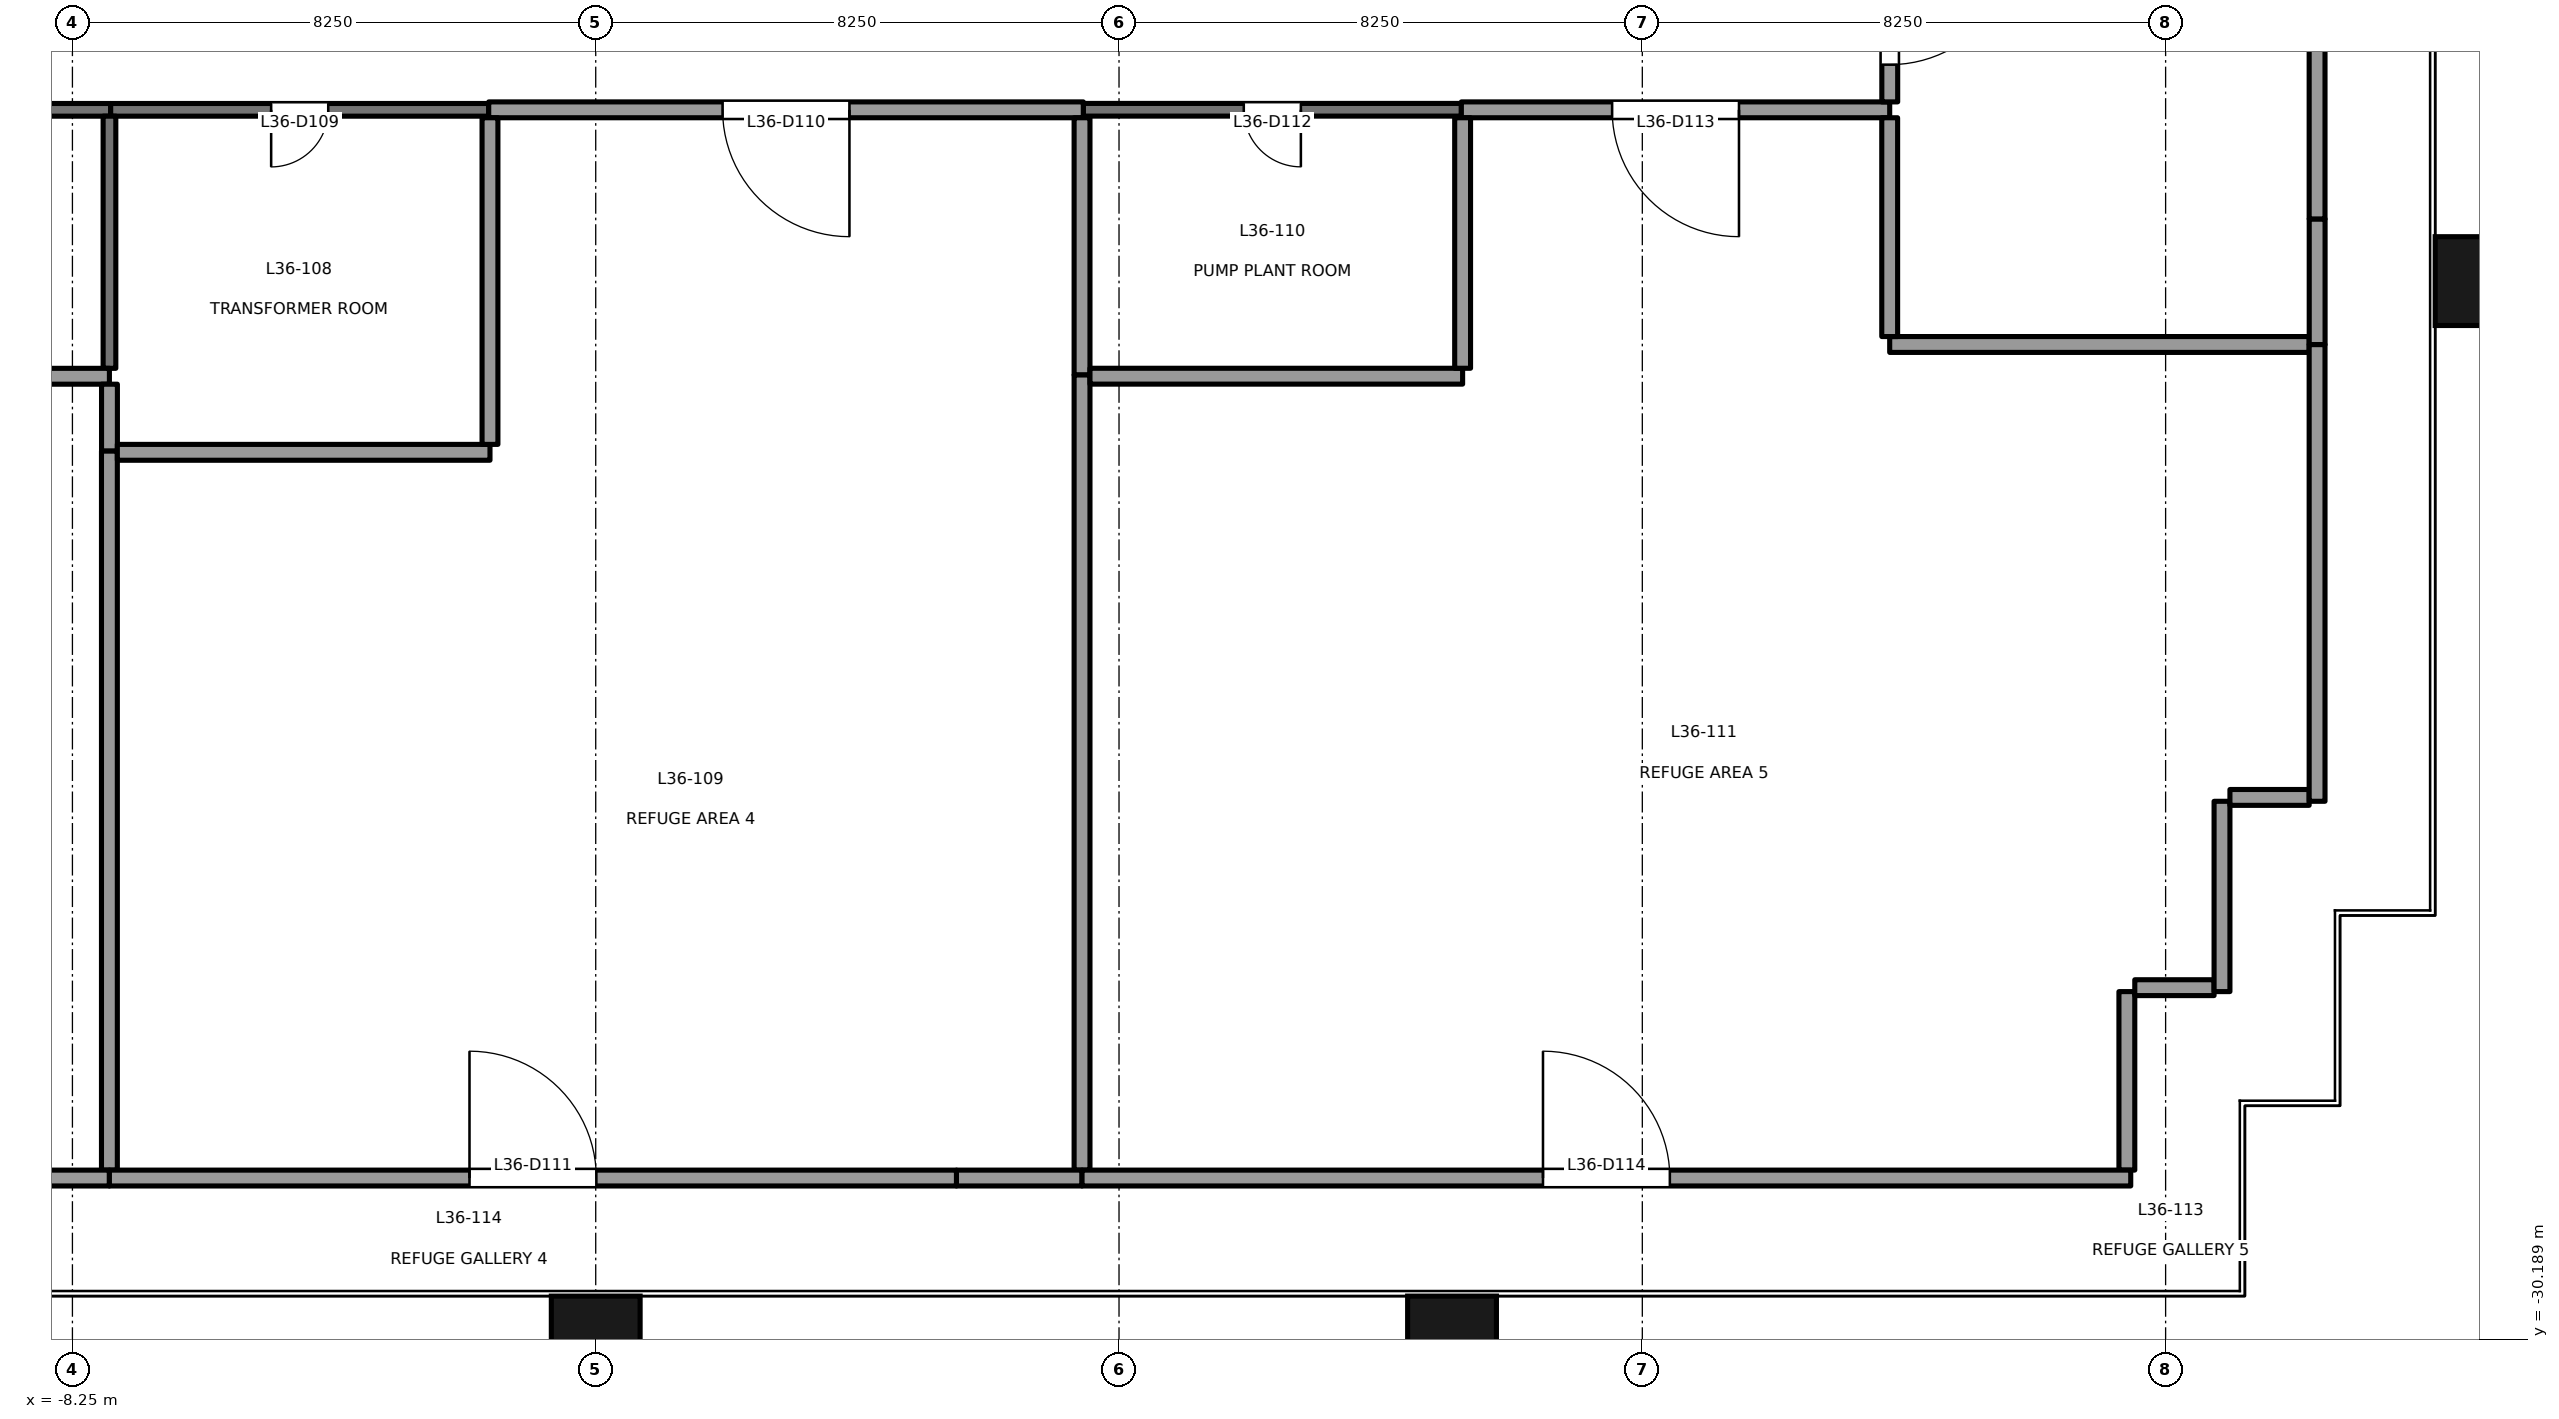
"""IFC4 building model, lengths in metres.
Left out: names, types, materials, properties, quantities, classifications, styles, units other than length and angle.
Written with IfcOpenShell. Run it as: python <this file> out.ifc"""

import sys

from ifc_helpers import new_model, si_unit, direction, frame, frame_2d, origin, origin_2d, place, context, subcontext, project, spatial, rectangle, extrude, element, fill, save


model = new_model("IFC4")
c1 = context("Model", 3, precision=1e-05, world=origin(), true_north=direction((0.0, 1.0)))
c2 = subcontext(c1, "Body", "Model", "MODEL_VIEW")
j1 = project(units=[si_unit("LENGTHUNIT", "METRE"), si_unit("PLANEANGLEUNIT", "RADIAN")], contexts=[c1])
p1 = place(None, origin())
s1 = spatial("IfcSite", under=j1, at=p1, CompositionType="ELEMENT")
p2 = place(p1, origin())
s2 = spatial("IfcBuilding", under=s1, at=p2, CompositionType="ELEMENT")
p3 = place(p2, frame((0.0, 0.0, 158.1)))
s3 = spatial("IfcBuildingStorey", under=s2, at=p3, CompositionType="ELEMENT", Elevation=158.1)
for number, where, z_axis, x_axis in (
    (1, (0.0, -30.4, -0.2), (0.0, 0.0, 1.0), (1.0, 0.0, 0.0)),
    (2, (13.5, -30.4, -0.2), (0.0, 0.0, 1.0), (1.0, 0.0, 0.0)),
    (3, (29.9, -13.5, -0.2), (0.0, 0.0, 1.0), (0.0, 1.0, 0.0)),
):
    element("IfcColumn", number, at=place(p3, frame(where, z_axis=z_axis, x_axis=x_axis)), inside=s3, PredefinedType="COLUMN", context=c2, shape_type="SweptSolid", body=[
        extrude(rectangle(XDim=1.4, YDim=1.8, at=origin_2d()), origin(), (0.0, 0.0, 1.0), 5.0),
    ])
p4 = place(p3, frame((-7.647, -10.8, 0.0), z_axis=(0.0, 0.0, 1.0), x_axis=(-1.0, 0.0, 0.0)))
e4 = element("IfcWall", 4, at=p4, inside=s3, PredefinedType="PARTITIONING", context=c2, shape_type="SweptSolid", body=[
    extrude(rectangle(XDim=6.0, YDim=0.2, at=frame_2d((3.0, 0.0))), origin(), (0.0, 0.0, 1.0), 3.9),
])
p5 = place(p4, frame((2.55, 0.0, 0.0)))
e5 = element("IfcOpeningElement", 5, at=p5, cuts=e4, PredefinedType="OPENING", context=c2, shape_type="SweptSolid", body=[
    extrude(rectangle(XDim=0.9, YDim=2.1, at=frame_2d((0.45, 1.05))), frame((0.0, 0.111, 0.0), z_axis=(0.0, -1.0, 0.0), x_axis=(1.0, 0.0, 0.0)), (0.0, 0.0, 1.0), 0.221),
])
p6 = place(p3, frame((-1.687, -10.8, 0.0), z_axis=(0.0, 0.0, 1.0), x_axis=(-1.0, 0.0, 0.0)))
e6 = element("IfcWall", 6, at=p6, inside=s3, PredefinedType="PARTITIONING", context=c2, shape_type="SweptSolid", body=[
    extrude(rectangle(XDim=5.96, YDim=0.2, at=frame_2d((2.98, 0.0))), origin(), (0.0, 0.0, 1.0), 4.0),
])
p7 = place(p6, frame((2.53, 0.0, 0.0)))
e7 = element("IfcOpeningElement", 7, at=p7, cuts=e6, PredefinedType="OPENING", context=c2, shape_type="SweptSolid", body=[
    extrude(rectangle(XDim=0.9, YDim=2.1, at=frame_2d((0.45, 1.05))), frame((0.0, 0.111, 0.0), z_axis=(0.0, -1.0, 0.0), x_axis=(1.0, 0.0, 0.0)), (0.0, 0.0, 1.0), 0.221),
])
p8 = place(p3, frame((7.687, -10.8, 0.0), z_axis=(0.0, 0.0, 1.0), x_axis=(-1.0, 0.0, 0.0)))
e8 = element("IfcWall", 8, at=p8, inside=s3, PredefinedType="PARTITIONING", context=c2, shape_type="SweptSolid", body=[
    extrude(rectangle(XDim=9.374, YDim=0.25, at=frame_2d((4.687, 0.0))), origin(), (0.0, 0.0, 1.0), 2.55),
])
p9 = place(p8, frame((3.687, 0.0, 0.0)))
e9 = element("IfcOpeningElement", 9, at=p9, cuts=e8, PredefinedType="OPENING", context=c2, shape_type="SweptSolid", body=[
    extrude(rectangle(XDim=2.0, YDim=2.1, at=frame_2d((1.0, 1.05))), frame((0.0, 0.135, 0.0), z_axis=(0.0, -1.0, 0.0), x_axis=(1.0, 0.0, 0.0)), (0.0, 0.0, 1.0), 0.271),
])
p10 = place(p3, frame((13.647, -10.799, 0.0), z_axis=(0.0, 0.0, 1.0), x_axis=(-1.0, 0.0, 0.0)))
e10 = element("IfcWall", 10, at=p10, inside=s3, PredefinedType="PARTITIONING", context=c2, shape_type="SweptSolid", body=[
    extrude(rectangle(XDim=5.96, YDim=0.2, at=frame_2d((2.98, 0.0))), origin(), (0.0, 0.0, 1.0), 2.55),
])
p11 = place(p10, frame((2.53, 0.0, 0.0)))
e11 = element("IfcOpeningElement", 11, at=p11, cuts=e10, PredefinedType="OPENING", context=c2, shape_type="SweptSolid", body=[
    extrude(rectangle(XDim=0.9, YDim=2.1, at=frame_2d((0.45, 1.05))), frame((0.0, 0.111, 0.0), z_axis=(0.0, -1.0, 0.0), x_axis=(1.0, 0.0, 0.0)), (0.0, 0.0, 1.0), 0.221),
])
p12 = place(p3, frame((20.4, -10.8, 0.0), z_axis=(0.0, 0.0, 1.0), x_axis=(-1.0, 0.0, 0.0)))
e12 = element("IfcWall", 12, at=p12, inside=s3, PredefinedType="PARTITIONING", context=c2, shape_type="SweptSolid", body=[
    extrude(rectangle(XDim=6.753, YDim=0.25, at=frame_2d((3.376, 0.0))), origin(), (0.0, 0.0, 1.0), 2.55),
])
p13 = place(p12, frame((2.376, 0.0, 0.0)))
e13 = element("IfcOpeningElement", 13, at=p13, cuts=e12, PredefinedType="OPENING", context=c2, shape_type="SweptSolid", body=[
    extrude(rectangle(XDim=2.0, YDim=2.1, at=frame_2d((1.0, 1.05))), frame((0.0, 0.135, 0.0), z_axis=(0.0, -1.0, 0.0), x_axis=(1.0, 0.0, 0.0)), (0.0, 0.0, 1.0), 0.271),
])
p14 = place(p3, frame((20.401, -7.5, 0.0), z_axis=(0.0, 0.0, 1.0), x_axis=(0.0, -1.0, 0.0)))
e14 = element("IfcWall", 14, at=p14, inside=s3, PredefinedType="PARTITIONING", context=c2, shape_type="SweptSolid", body=[
    extrude(rectangle(XDim=3.175, YDim=0.25, at=frame_2d((1.587, 0.0))), origin(), (0.0, 0.0, 1.0), 4.8),
])
p15 = place(p14, frame((0.588, 0.0, 0.0)))
e15 = element("IfcOpeningElement", 15, at=p15, cuts=e14, PredefinedType="OPENING", context=c2, shape_type="SweptSolid", body=[
    extrude(rectangle(XDim=2.0, YDim=2.1, at=frame_2d((1.0, 1.05))), frame((0.0, 0.135, 0.0), z_axis=(0.0, -1.0, 0.0), x_axis=(1.0, 0.0, 0.0)), (0.0, 0.0, 1.0), 0.271),
])
p16 = place(p3, frame((-7.667, -15.0, 0.0), z_axis=(0.0, 0.0, 1.0), x_axis=(-1.0, 0.0, 0.0)))
e16 = element("IfcWall", 16, at=p16, inside=s3, PredefinedType="PARTITIONING", context=c2, shape_type="SweptSolid", body=[
    extrude(rectangle(XDim=6.0, YDim=0.25, at=frame_2d((3.0, 0.0))), origin(), (0.0, 0.0, 1.0), 3.9),
])
p17 = place(p3, frame((-7.666, -10.9, 0.0), z_axis=(0.0, 0.0, 1.0), x_axis=(0.0, -1.0, 0.0)))
e17 = element("IfcWall", 17, at=p17, inside=s3, PredefinedType="PARTITIONING", context=c2, shape_type="SweptSolid", body=[
    extrude(rectangle(XDim=3.975, YDim=0.2, at=frame_2d((1.988, 0.0))), origin(), (0.0, 0.0, 1.0), 4.8),
])
p18 = place(p3, frame((-7.666, -15.125, 0.0), z_axis=(0.0, 0.0, 1.0), x_axis=(0.0, -1.0, 0.0)))
e18 = element("IfcWall", 18, at=p18, inside=s3, PredefinedType="PARTITIONING", context=c2, shape_type="SweptSolid", body=[
    extrude(rectangle(XDim=1.055, YDim=0.25, at=frame_2d((0.527, 0.0))), origin(), (0.0, 0.0, 1.0), 4.8),
])
p19 = place(p3, frame((-7.667, -16.18, 0.0), z_axis=(0.0, 0.0, 1.0), x_axis=(0.0, -1.0, 0.0)))
e19 = element("IfcWall", 19, at=p19, inside=s3, PredefinedType="PARTITIONING", context=c2, shape_type="SweptSolid", body=[
    extrude(rectangle(XDim=11.334, YDim=0.25, at=frame_2d((5.667, 0.0))), origin(), (0.0, 0.0, 1.0), 3.7),
])
p20 = place(p3, frame((-7.667, -27.639, 0.0), z_axis=(0.0, 0.0, 1.0), x_axis=(-1.0, 0.0, 0.0)))
e20 = element("IfcWall", 20, at=p20, inside=s3, PredefinedType="PARTITIONING", context=c2, shape_type="SweptSolid", body=[
    extrude(rectangle(XDim=1.98, YDim=0.25, at=frame_2d((0.99, 0.0))), origin(), (0.0, 0.0, 1.0), 4.8),
])
p21 = place(p3, frame((-1.667, -16.199, 0.0), z_axis=(0.0, 0.0, 1.0), x_axis=(-1.0, 0.0, 0.0)))
e21 = element("IfcWall", 21, at=p21, inside=s3, PredefinedType="PARTITIONING", context=c2, shape_type="SweptSolid", body=[
    extrude(rectangle(XDim=5.875, YDim=0.25, at=frame_2d((2.938, 0.0))), origin(), (0.0, 0.0, 1.0), 4.0),
])
p22 = place(p3, frame((-1.667, -10.925, 0.0), z_axis=(0.0, 0.0, 1.0), x_axis=(0.0, -1.0, 0.0)))
e22 = element("IfcWall", 22, at=p22, inside=s3, PredefinedType="PARTITIONING", context=c2, shape_type="SweptSolid", body=[
    extrude(rectangle(XDim=5.149, YDim=0.25, at=frame_2d((2.574, 0.0))), origin(), (0.0, 0.0, 1.0), 4.8),
])
p23 = place(p3, frame((7.667, -10.925, 0.0), z_axis=(0.0, 0.0, 1.0), x_axis=(0.0, -1.0, 0.0)))
e23 = element("IfcWall", 23, at=p23, inside=s3, PredefinedType="PARTITIONING", context=c2, shape_type="SweptSolid", body=[
    extrude(rectangle(XDim=4.055, YDim=0.25, at=frame_2d((2.027, 0.0))), origin(), (0.0, 0.0, 1.0), 4.8),
])
p24 = place(p3, frame((7.667, -14.98, 0.0), z_axis=(0.0, 0.0, 1.0), x_axis=(0.0, -1.0, 0.0)))
e24 = element("IfcWall", 24, at=p24, inside=s3, PredefinedType="PARTITIONING", context=c2, shape_type="SweptSolid", body=[
    extrude(rectangle(XDim=12.534, YDim=0.25, at=frame_2d((6.267, 0.0))), origin(), (0.0, 0.0, 1.0), 3.7),
])
p25 = place(p3, frame((7.667, -27.639, 0.0), z_axis=(0.0, 0.0, 1.0), x_axis=(-1.0, 0.0, 0.0)))
e25 = element("IfcWall", 25, at=p25, inside=s3, PredefinedType="PARTITIONING", context=c2, shape_type="SweptSolid", body=[
    extrude(rectangle(XDim=1.98, YDim=0.25, at=frame_2d((0.99, 0.0))), origin(), (0.0, 0.0, 1.0), 4.8),
])
p26 = place(p3, frame((-7.667, -27.639, 0.0), z_axis=(0.0, 0.0, 1.0), x_axis=(1.0, 0.0, 0.0)))
e26 = element("IfcWall", 26, at=p26, inside=s3, PredefinedType="PARTITIONING", context=c2, shape_type="SweptSolid", body=[
    extrude(rectangle(XDim=13.354, YDim=0.25, at=frame_2d((6.677, 0.0))), origin(), (0.0, 0.0, 1.0), 2.55),
])
p27 = place(p26, frame((5.677, 0.0, 0.0)))
e27 = element("IfcOpeningElement", 27, at=p27, cuts=e26, PredefinedType="OPENING", context=c2, shape_type="SweptSolid", body=[
    extrude(rectangle(XDim=2.0, YDim=2.1, at=frame_2d((1.0, 1.05))), frame((0.0, 0.135, 0.0), z_axis=(0.0, -1.0, 0.0), x_axis=(1.0, 0.0, 0.0)), (0.0, 0.0, 1.0), 0.271),
])
p28 = place(p3, frame((13.667, -14.999, 0.0), z_axis=(0.0, 0.0, 1.0), x_axis=(-1.0, 0.0, 0.0)))
e28 = element("IfcWall", 28, at=p28, inside=s3, PredefinedType="PARTITIONING", context=c2, shape_type="SweptSolid", body=[
    extrude(rectangle(XDim=5.875, YDim=0.25, at=frame_2d((2.938, 0.0))), origin(), (0.0, 0.0, 1.0), 2.55),
])
p29 = place(p3, frame((13.667, -10.925, 0.0), z_axis=(0.0, 0.0, 1.0), x_axis=(0.0, -1.0, 0.0)))
e29 = element("IfcWall", 29, at=p29, inside=s3, PredefinedType="PARTITIONING", context=c2, shape_type="SweptSolid", body=[
    extrude(rectangle(XDim=3.949, YDim=0.25, at=frame_2d((1.975, 0.0))), origin(), (0.0, 0.0, 1.0), 2.55),
])
p30 = place(p3, frame((20.4, -14.499, 0.0), z_axis=(0.0, 0.0, 1.0), x_axis=(1.0, 0.0, 0.0)))
e30 = element("IfcWall", 30, at=p30, inside=s3, PredefinedType="PARTITIONING", context=c2, shape_type="SweptSolid", body=[
    extrude(rectangle(XDim=6.613, YDim=0.25, at=frame_2d((3.307, 0.0))), origin(), (0.0, 0.0, 1.0), 4.8),
])
p31 = place(p3, frame((20.4, -10.925, 0.0), z_axis=(0.0, 0.0, 1.0), x_axis=(0.0, -1.0, 0.0)))
e31 = element("IfcWall", 31, at=p31, inside=s3, PredefinedType="PARTITIONING", context=c2, shape_type="SweptSolid", body=[
    extrude(rectangle(XDim=3.449, YDim=0.25, at=frame_2d((1.725, 0.0))), origin(), (0.0, 0.0, 1.0), 4.8),
])
p32 = place(p3, frame((24.139, -24.7, 0.0), z_axis=(0.0, 0.0, 1.0), x_axis=(0.0, -1.0, 0.0)))
e32 = element("IfcWall", 32, at=p32, inside=s3, PredefinedType="PARTITIONING", context=c2, shape_type="SweptSolid", body=[
    extrude(rectangle(XDim=2.814, YDim=0.25, at=frame_2d((1.407, 0.0))), origin(), (0.0, 0.0, 1.0), 4.8),
])
p33 = place(p3, frame((7.667, -27.639, 0.0), z_axis=(0.0, 0.0, 1.0), x_axis=(1.0, 0.0, 0.0)))
e33 = element("IfcWall", 33, at=p33, inside=s3, PredefinedType="PARTITIONING", context=c2, shape_type="SweptSolid", body=[
    extrude(rectangle(XDim=16.533, YDim=0.25, at=frame_2d((8.267, 0.0))), origin(), (0.0, 0.0, 1.0), 2.55),
])
p34 = place(p33, frame((7.267, 0.0, 0.0)))
e34 = element("IfcOpeningElement", 34, at=p34, cuts=e33, PredefinedType="OPENING", context=c2, shape_type="SweptSolid", body=[
    extrude(rectangle(XDim=2.0, YDim=2.1, at=frame_2d((1.0, 1.05))), frame((0.0, 0.135, 0.0), z_axis=(0.0, -1.0, 0.0), x_axis=(1.0, 0.0, 0.0)), (0.0, 0.0, 1.0), 0.271),
])
p35 = place(p3, frame((25.514, -24.638, 0.0), z_axis=(0.0, 0.0, 1.0), x_axis=(-1.0, 0.0, 0.0)))
e35 = element("IfcWall", 35, at=p35, inside=s3, PredefinedType="PARTITIONING", context=c2, shape_type="SweptSolid", body=[
    extrude(rectangle(XDim=1.25, YDim=0.25, at=frame_2d((0.625, 0.0))), origin(), (0.0, 0.0, 1.0), 4.8),
])
p36 = place(p3, frame((25.639, -21.7, 0.0), z_axis=(0.0, 0.0, 1.0), x_axis=(0.0, -1.0, 0.0)))
e36 = element("IfcWall", 36, at=p36, inside=s3, PredefinedType="PARTITIONING", context=c2, shape_type="SweptSolid", body=[
    extrude(rectangle(XDim=3.0, YDim=0.25, at=frame_2d((1.5, 0.0))), origin(), (0.0, 0.0, 1.0), 4.8),
])
p37 = place(p3, frame((27.013, -21.639, 0.0), z_axis=(0.0, 0.0, 1.0), x_axis=(-1.0, 0.0, 0.0)))
e37 = element("IfcWall", 37, at=p37, inside=s3, PredefinedType="PARTITIONING", context=c2, shape_type="SweptSolid", body=[
    extrude(rectangle(XDim=1.249, YDim=0.25, at=frame_2d((0.625, 0.0))), origin(), (0.0, 0.0, 1.0), 4.8),
])
p38 = place(p3, frame((27.138, -14.5, 0.0), z_axis=(0.0, 0.0, 1.0), x_axis=(0.0, -1.0, 0.0)))
e38 = element("IfcWall", 38, at=p38, inside=s3, PredefinedType="PARTITIONING", context=c2, shape_type="SweptSolid", body=[
    extrude(rectangle(XDim=7.2, YDim=0.25, at=frame_2d((3.6, 0.0))), origin(), (0.0, 0.0, 1.0), 4.8),
])
p39 = place(p3, frame((27.139, -12.52, 0.0), z_axis=(0.0, 0.0, 1.0), x_axis=(0.0, -1.0, 0.0)))
e39 = element("IfcWall", 39, at=p39, inside=s3, PredefinedType="PARTITIONING", context=c2, shape_type="SweptSolid", body=[
    extrude(rectangle(XDim=1.98, YDim=0.25, at=frame_2d((0.99, 0.0))), origin(), (0.0, 0.0, 1.0), 4.8),
])
p40 = place(p3, frame((27.138, 4.7, 0.0), z_axis=(0.0, 0.0, 1.0), x_axis=(0.0, -1.0, 0.0)))
e40 = element("IfcWall", 40, at=p40, inside=s3, PredefinedType="PARTITIONING", context=c2, shape_type="SweptSolid", body=[
    extrude(rectangle(XDim=17.22, YDim=0.25, at=frame_2d((8.61, 0.0))), origin(), (0.0, 0.0, 1.0), 2.75),
])
p41 = place(p7, origin())
e41 = element("IfcDoor", 41, at=p41, inside=s3, OperationType="SINGLE_SWING_RIGHT", PredefinedType="DOOR", context=c2, shape_type="SweptSolid", body=[
    extrude(rectangle(XDim=0.9, YDim=2.1, at=frame_2d((0.45, 1.05))), frame((0.0, 0.025, 0.0), z_axis=(0.0, -1.0, 0.0), x_axis=(1.0, 0.0, 0.0)), (0.0, 0.0, 1.0), 0.05),
])
fill(e7, e41)
p42 = place(p9, origin())
e42 = element("IfcDoor", 42, at=p42, inside=s3, OperationType="DOUBLE_DOOR_SINGLE_SWING", PredefinedType="DOOR", context=c2, shape_type="SweptSolid", body=[
    extrude(rectangle(XDim=2.0, YDim=2.1, at=frame_2d((1.0, 1.05))), frame((0.0, 0.025, 0.0), z_axis=(0.0, -1.0, 0.0), x_axis=(1.0, 0.0, 0.0)), (0.0, 0.0, 1.0), 0.05),
])
fill(e9, e42)
p43 = place(p27, origin())
e43 = element("IfcDoor", 43, at=p43, inside=s3, OperationType="DOUBLE_DOOR_SINGLE_SWING", PredefinedType="DOOR", context=c2, shape_type="SweptSolid", body=[
    extrude(rectangle(XDim=2.0, YDim=2.1, at=frame_2d((1.0, 1.05))), frame((0.0, 0.025, 0.0), z_axis=(0.0, -1.0, 0.0), x_axis=(1.0, 0.0, 0.0)), (0.0, 0.0, 1.0), 0.05),
])
fill(e27, e43)
p44 = place(p11, origin())
e44 = element("IfcDoor", 44, at=p44, inside=s3, OperationType="SINGLE_SWING_LEFT", PredefinedType="DOOR", context=c2, shape_type="SweptSolid", body=[
    extrude(rectangle(XDim=0.9, YDim=2.1, at=frame_2d((0.45, 1.05))), frame((0.0, 0.025, 0.0), z_axis=(0.0, -1.0, 0.0), x_axis=(1.0, 0.0, 0.0)), (0.0, 0.0, 1.0), 0.05),
])
fill(e11, e44)
p45 = place(p13, origin())
e45 = element("IfcDoor", 45, at=p45, inside=s3, OperationType="DOUBLE_DOOR_SINGLE_SWING", PredefinedType="DOOR", context=c2, shape_type="SweptSolid", body=[
    extrude(rectangle(XDim=2.0, YDim=2.1, at=frame_2d((1.0, 1.05))), frame((0.0, 0.025, 0.0), z_axis=(0.0, -1.0, 0.0), x_axis=(1.0, 0.0, 0.0)), (0.0, 0.0, 1.0), 0.05),
])
fill(e13, e45)
p46 = place(p34, origin())
e46 = element("IfcDoor", 46, at=p46, inside=s3, OperationType="DOUBLE_DOOR_SINGLE_SWING", PredefinedType="DOOR", context=c2, shape_type="SweptSolid", body=[
    extrude(rectangle(XDim=2.0, YDim=2.1, at=frame_2d((1.0, 1.05))), frame((0.0, 0.025, 0.0), z_axis=(0.0, -1.0, 0.0), x_axis=(1.0, 0.0, 0.0)), (0.0, 0.0, 1.0), 0.05),
])
fill(e34, e46)
p47 = place(p15, origin())
e47 = element("IfcDoor", 47, at=p47, inside=s3, OperationType="DOUBLE_DOOR_SINGLE_SWING", PredefinedType="DOOR", context=c2, shape_type="SweptSolid", body=[
    extrude(rectangle(XDim=2.0, YDim=2.1, at=frame_2d((1.0, 1.05))), frame((0.0, 0.025, 0.0), z_axis=(0.0, -1.0, 0.0), x_axis=(1.0, 0.0, 0.0)), (0.0, 0.0, 1.0), 0.05),
])
fill(e15, e47)
save(model, sys.argv[1])
